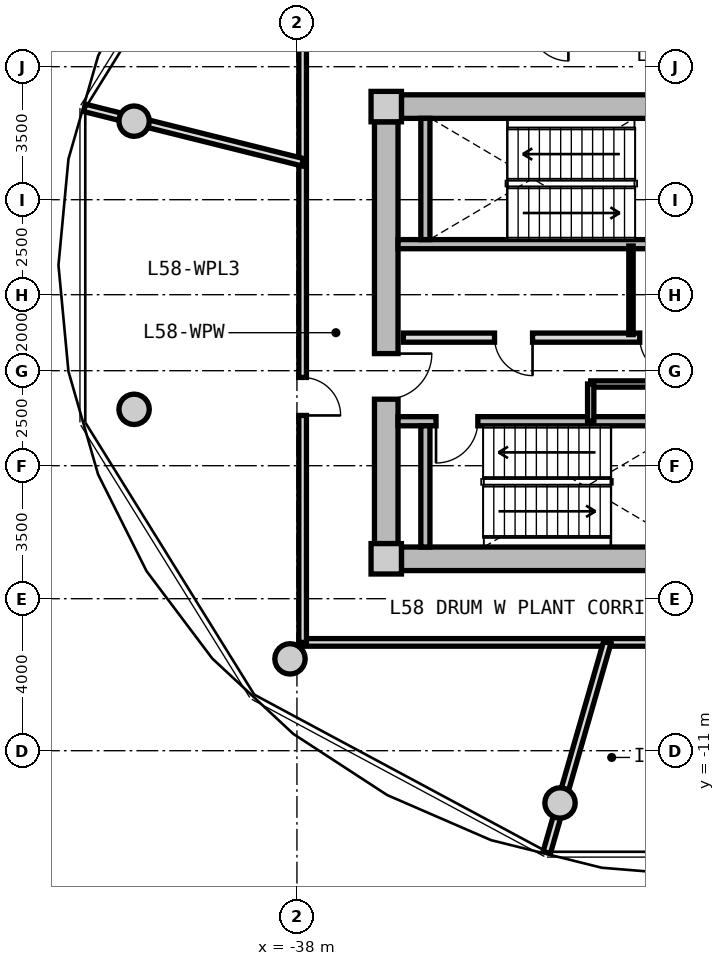
"""IFC4 building model, lengths in metres.
Left out: names, types, materials, properties, quantities, classifications, styles, units other than length and angle.
Written with IfcOpenShell. Run it as: python <this file> out.ifc"""

import sys

from ifc_helpers import new_model, si_unit, direction, frame, frame_2d, origin, origin_2d, place, context, subcontext, project, spatial, rectangle, circle, extrude, source, transform, mapped, element, fill, save


model = new_model("IFC4")
c1 = context("Model", 3, precision=1e-05, world=origin(), true_north=direction((0.0, 1.0)))
c2 = subcontext(c1, "Body", "Model", "MODEL_VIEW")
j1 = project(units=[si_unit("LENGTHUNIT", "METRE"), si_unit("PLANEANGLEUNIT", "RADIAN")], contexts=[c1])
p1 = place(None, origin())
s1 = spatial("IfcSite", under=j1, at=p1, CompositionType="ELEMENT")
p2 = place(p1, origin())
s2 = spatial("IfcBuilding", under=s1, at=p2, CompositionType="ELEMENT")
p3 = place(p2, frame((0.0, 0.0, 186.15)))
s3 = spatial("IfcBuildingStorey", under=s2, at=p3, CompositionType="ELEMENT", Elevation=186.15)
m1 = source(origin(), c2, "Body", "SweptSolid", [
    extrude(rectangle(XDim=0.8, YDim=0.8, at=origin_2d()), origin(), (0.0, 0.0, 1.0), 4.5),
])
for number, where, z_axis, x_axis in (
    (1, (-35.65, -5.95, 0.0), (0.0, 0.0, 1.0), (1.0, 0.0, 0.0)),
    (2, (-35.65, 5.95, 0.0), (0.0, 0.0, 1.0), (1.0, 0.0, 0.0)),
):
    element("IfcColumn", number, at=place(p3, frame(where, z_axis=z_axis, x_axis=x_axis)), inside=s3, PredefinedType="COLUMN", context=c2, shape_type="MappedRepresentation", body=[
        mapped(m1, transform((0.0, 0.0, 0.0), x_axis=(1.0, 0.0, 0.0), y_axis=(0.0, 1.0, 0.0), z_axis=(0.0, 0.0, 1.0), scale=1.0)),
    ])
m2 = source(origin(), c2, "Body", "SweptSolid", [
    extrude(rectangle(XDim=14.5, YDim=0.62, at=frame_2d((7.25, 0.0))), origin(), (0.0, 0.0, 1.0), 4.08),
])
for number, where, z_axis, x_axis in (
    (3, (-35.25, 5.95, 0.0), (0.0, 0.0, 1.0), (1.0, 0.0, 0.0)),
    (4, (-20.75, -5.95, 0.0), (0.0, 0.0, 1.0), (-1.0, 0.0, 0.0)),
):
    element("IfcWall", number, at=place(p3, frame(where, z_axis=z_axis, x_axis=x_axis)), inside=s3, PredefinedType="SHEAR", context=c2, shape_type="MappedRepresentation", body=[
        mapped(m2, transform((0.0, 0.0, 0.0), x_axis=(1.0, 0.0, 0.0), y_axis=(0.0, 1.0, 0.0), z_axis=(0.0, 0.0, 1.0), scale=1.0)),
    ])
m3 = source(origin(), c2, "Body", "SweptSolid", [
    extrude(rectangle(XDim=11.1, YDim=0.62, at=frame_2d((5.55, 0.0))), origin(), (0.0, 0.0, 1.0), 4.08),
])
p4 = place(p3, frame((-35.65, -5.55, 0.0), z_axis=(0.0, 0.0, 1.0), x_axis=(0.0, 1.0, 0.0)))
e5 = element("IfcWall", 5, at=p4, inside=s3, PredefinedType="SHEAR", context=c2, shape_type="MappedRepresentation", body=[
    mapped(m3, transform((0.0, 0.0, 0.0), x_axis=(1.0, 0.0, 0.0), y_axis=(0.0, 1.0, 0.0), z_axis=(0.0, 0.0, 1.0), scale=1.0)),
])
p5 = place(p4, frame((3.8, 0.0, 0.0)))
e6 = element("IfcOpeningElement", 6, at=p5, cuts=e5, PredefinedType="OPENING", context=c2, shape_type="SweptSolid", body=[
    extrude(rectangle(XDim=1.2, YDim=2.15, at=frame_2d((0.6, 1.075))), frame((0.0, 0.32, 0.0), z_axis=(0.0, -1.0, 0.0), x_axis=(1.0, 0.0, 0.0)), (0.0, 0.0, 1.0), 0.64),
])
m4 = source(origin(), c2, "Body", "SweptSolid", [
    extrude(circle(Radius=0.4, at=origin_2d()), origin(), (0.0, 0.0, 1.0), 4.08),
])
for number, where, z_axis, x_axis in (
    (7, (-42.285, 5.567, 0.0), (0.0, 0.0, 1.0), (1.0, 0.0, 0.0)),
    (8, (-42.285, -2.016, 0.0), (0.0, 0.0, 1.0), (1.0, 0.0, 0.0)),
    (9, (-38.183, -8.584, 0.0), (0.0, 0.0, 1.0), (1.0, 0.0, 0.0)),
    (10, (-31.077, -12.375, 0.0), (0.0, 0.0, 1.0), (1.0, 0.0, 0.0)),
):
    element("IfcColumn", number, at=place(p3, frame(where, z_axis=z_axis, x_axis=x_axis)), inside=s3, PredefinedType="COLUMN", context=c2, shape_type="MappedRepresentation", body=[
        mapped(m4, transform((0.0, 0.0, 0.0), x_axis=(1.0, 0.0, 0.0), y_axis=(0.0, 1.0, 0.0), z_axis=(0.0, 0.0, 1.0), scale=1.0)),
    ])
m5 = source(origin(), c2, "Body", "SweptSolid", [
    extrude(rectangle(XDim=7.88, YDim=0.24, at=frame_2d((3.94, 0.0))), origin(), (0.0, 0.0, 1.0), 4.08),
])
p6 = place(p3, frame((-35.34, 2.33, 0.0), z_axis=(0.0, 0.0, 1.0), x_axis=(1.0, 0.0, 0.0)))
e11 = element("IfcWall", 11, at=p6, inside=s3, PredefinedType="PARTITIONING", context=c2, shape_type="MappedRepresentation", body=[
    mapped(m5, transform((0.0, 0.0, 0.0), x_axis=(1.0, 0.0, 0.0), y_axis=(0.0, 1.0, 0.0), z_axis=(0.0, 0.0, 1.0), scale=1.0)),
])
m6 = source(origin(), c2, "Body", "SweptSolid", [
    extrude(rectangle(XDim=3.19, YDim=0.24, at=frame_2d((1.595, 0.0))), origin(), (0.0, 0.0, 1.0), 4.08),
])
p7 = place(p3, frame((-34.62, 2.45, 0.0), z_axis=(0.0, 0.0, 1.0), x_axis=(0.0, 1.0, 0.0)))
e12 = element("IfcWall", 12, at=p7, inside=s3, PredefinedType="PARTITIONING", context=c2, shape_type="MappedRepresentation", body=[
    mapped(m6, transform((0.0, 0.0, 0.0), x_axis=(1.0, 0.0, 0.0), y_axis=(0.0, 1.0, 0.0), z_axis=(0.0, 0.0, 1.0), scale=1.0)),
])
p8 = place(p3, frame((-35.34, -2.33, 0.0), z_axis=(0.0, 0.0, 1.0), x_axis=(1.0, 0.0, 0.0)))
e13 = element("IfcWall", 13, at=p8, inside=s3, PredefinedType="PARTITIONING", context=c2, shape_type="MappedRepresentation", body=[
    mapped(m5, transform((0.0, 0.0, 0.0), x_axis=(1.0, 0.0, 0.0), y_axis=(0.0, 1.0, 0.0), z_axis=(0.0, 0.0, 1.0), scale=1.0)),
])
p9 = place(p8, frame((1.0, 0.0, 0.0)))
e14 = element("IfcOpeningElement", 14, at=p9, cuts=e13, PredefinedType="OPENING", context=c2, shape_type="SweptSolid", body=[
    extrude(rectangle(XDim=1.1, YDim=2.15, at=frame_2d((0.55, 1.075))), frame((0.0, 0.13, 0.0), z_axis=(0.0, -1.0, 0.0), x_axis=(1.0, 0.0, 0.0)), (0.0, 0.0, 1.0), 0.26),
])
p10 = place(p3, frame((-34.62, -5.64, 0.0), z_axis=(0.0, 0.0, 1.0), x_axis=(0.0, 1.0, 0.0)))
e15 = element("IfcWall", 15, at=p10, inside=s3, PredefinedType="PARTITIONING", context=c2, shape_type="MappedRepresentation", body=[
    mapped(m6, transform((0.0, 0.0, 0.0), x_axis=(1.0, 0.0, 0.0), y_axis=(0.0, 1.0, 0.0), z_axis=(0.0, 0.0, 1.0), scale=1.0)),
])
m7 = source(origin(), c2, "Body", "SweptSolid", [
    extrude(rectangle(XDim=7.62, YDim=0.24, at=frame_2d((3.81, 0.0))), origin(), (0.0, 0.0, 1.0), 4.065),
])
p11 = place(p3, frame((-35.2, -0.13, 0.0), z_axis=(0.0, 0.0, 1.0), x_axis=(1.0, 0.0, 0.0)))
e16 = element("IfcWall", 16, at=p11, inside=s3, PredefinedType="PARTITIONING", context=c2, shape_type="MappedRepresentation", body=[
    mapped(m7, transform((0.0, 0.0, 0.0), x_axis=(1.0, 0.0, 0.0), y_axis=(0.0, 1.0, 0.0), z_axis=(0.0, 0.0, 1.0), scale=1.0)),
])
p12 = place(p11, frame((6.22, 0.0, 0.0)))
e17 = element("IfcOpeningElement", 17, at=p12, cuts=e16, PredefinedType="OPENING", context=c2, shape_type="SweptSolid", body=[
    extrude(rectangle(XDim=1.0, YDim=2.1, at=frame_2d((0.5, 1.05))), frame((0.0, 0.13, 0.0), z_axis=(0.0, -1.0, 0.0), x_axis=(1.0, 0.0, 0.0)), (0.0, 0.0, 1.0), 0.26),
])
p13 = place(p11, frame((2.4, 0.0, 0.0)))
e18 = element("IfcOpeningElement", 18, at=p13, cuts=e16, PredefinedType="OPENING", context=c2, shape_type="SweptSolid", body=[
    extrude(rectangle(XDim=1.0, YDim=2.1, at=frame_2d((0.5, 1.05))), frame((0.0, 0.13, 0.0), z_axis=(0.0, -1.0, 0.0), x_axis=(1.0, 0.0, 0.0)), (0.0, 0.0, 1.0), 0.26),
])
m8 = source(origin(), c2, "Body", "SweptSolid", [
    extrude(rectangle(XDim=2.33, YDim=0.115, at=frame_2d((1.165, 0.0))), origin(), (0.0, 0.0, 1.0), 4.065),
])
p14 = place(p3, frame((-29.21, -0.05, 0.0), z_axis=(0.0, 0.0, 1.0), x_axis=(0.0, 1.0, 0.0)))
e19 = element("IfcWall", 19, at=p14, inside=s3, PredefinedType="PARTITIONING", context=c2, shape_type="MappedRepresentation", body=[
    mapped(m8, transform((0.0, 0.0, 0.0), x_axis=(1.0, 0.0, 0.0), y_axis=(0.0, 1.0, 0.0), z_axis=(0.0, 0.0, 1.0), scale=1.0)),
])
m9 = source(origin(), c2, "Body", "SweptSolid", [
    extrude(rectangle(XDim=4.77, YDim=0.165, at=frame_2d((2.385, 0.0))), origin(), (0.0, 0.0, 1.0), 4.065),
])
p15 = place(p3, frame((-30.27, -1.35, 0.0), z_axis=(0.0, 0.0, 1.0), x_axis=(1.0, 0.0, 0.0)))
e20 = element("IfcWall", 20, at=p15, inside=s3, PredefinedType="PARTITIONING", context=c2, shape_type="MappedRepresentation", body=[
    mapped(m9, transform((0.0, 0.0, 0.0), x_axis=(1.0, 0.0, 0.0), y_axis=(0.0, 1.0, 0.0), z_axis=(0.0, 0.0, 1.0), scale=1.0)),
])
p16 = place(p15, frame((1.85, 0.0, 0.0)))
e21 = element("IfcOpeningElement", 21, at=p16, cuts=e20, PredefinedType="OPENING", context=c2, shape_type="SweptSolid", body=[
    extrude(rectangle(XDim=1.0, YDim=2.1, at=frame_2d((0.5, 1.05))), frame((0.0, 0.093, 0.0), z_axis=(0.0, -1.0, 0.0), x_axis=(1.0, 0.0, 0.0)), (0.0, 0.0, 1.0), 0.185),
])
m10 = source(origin(), c2, "Body", "SweptSolid", [
    extrude(rectangle(XDim=0.98, YDim=0.165, at=frame_2d((0.49, 0.0))), origin(), (0.0, 0.0, 1.0), 4.065),
])
p17 = place(p3, frame((-30.27, -2.33, 0.0), z_axis=(0.0, 0.0, 1.0), x_axis=(0.0, 1.0, 0.0)))
e22 = element("IfcWall", 22, at=p17, inside=s3, PredefinedType="PARTITIONING", context=c2, shape_type="MappedRepresentation", body=[
    mapped(m10, transform((0.0, 0.0, 0.0), x_axis=(1.0, 0.0, 0.0), y_axis=(0.0, 1.0, 0.0), z_axis=(0.0, 0.0, 1.0), scale=1.0)),
])
m11 = source(origin(), c2, "Body", "SweptSolid", [
    extrude(rectangle(XDim=19.7, YDim=0.2, at=frame_2d((9.85, 0.0))), origin(), (0.0, 0.0, 1.0), 4.065),
])
p18 = place(p3, frame((-18.15, -8.15, 0.0), z_axis=(0.0, 0.0, 1.0), x_axis=(-1.0, 0.0, 0.0)))
e23 = element("IfcWall", 23, at=p18, inside=s3, PredefinedType="PARTITIONING", context=c2, shape_type="MappedRepresentation", body=[
    mapped(m11, transform((0.0, 0.0, 0.0), x_axis=(1.0, 0.0, 0.0), y_axis=(0.0, 1.0, 0.0), z_axis=(0.0, 0.0, 1.0), scale=1.0)),
])
p19 = place(p18, frame((5.35, 0.0, 0.0)))
e24 = element("IfcOpeningElement", 24, at=p19, cuts=e23, PredefinedType="OPENING", context=c2, shape_type="SweptSolid", body=[
    extrude(rectangle(XDim=1.25, YDim=2.2, at=frame_2d((0.625, 1.1))), frame((0.0, 0.11, 0.0), z_axis=(0.0, -1.0, 0.0), x_axis=(1.0, 0.0, 0.0)), (0.0, 0.0, 1.0), 0.22),
])
m12 = source(origin(), c2, "Body", "SweptSolid", [
    extrude(rectangle(XDim=16.3, YDim=0.2, at=frame_2d((8.15, 0.0))), origin(), (0.0, 0.0, 1.0), 4.065),
])
p20 = place(p3, frame((-37.85, -8.15, 0.0), z_axis=(0.0, 0.0, 1.0), x_axis=(0.0, 1.0, 0.0)))
e25 = element("IfcWall", 25, at=p20, inside=s3, PredefinedType="PARTITIONING", context=c2, shape_type="MappedRepresentation", body=[
    mapped(m12, transform((0.0, 0.0, 0.0), x_axis=(1.0, 0.0, 0.0), y_axis=(0.0, 1.0, 0.0), z_axis=(0.0, 0.0, 1.0), scale=1.0)),
])
p21 = place(p20, frame((5.972, 0.0, 0.0)))
e26 = element("IfcOpeningElement", 26, at=p21, cuts=e25, PredefinedType="OPENING", context=c2, shape_type="SweptSolid", body=[
    extrude(rectangle(XDim=1.0, YDim=2.1, at=frame_2d((0.5, 1.05))), frame((0.0, 0.11, 0.0), z_axis=(0.0, -1.0, 0.0), x_axis=(1.0, 0.0, 0.0)), (0.0, 0.0, 1.0), 0.22),
])
m13 = source(origin(), c2, "Body", "SweptSolid", [
    extrude(rectangle(XDim=5.754, YDim=0.2, at=frame_2d((2.877, 0.0))), origin(), (0.0, 0.0, 1.0), 2.515),
])
p22 = place(p3, frame((-29.834, -8.15, 0.0), z_axis=(0.0, 0.0, 1.0), x_axis=(-0.276793809121, -0.960929335192, 0.0)))
e27 = element("IfcWall", 27, at=p22, inside=s3, PredefinedType="PARTITIONING", context=c2, shape_type="MappedRepresentation", body=[
    mapped(m13, transform((0.0, 0.0, 0.0), x_axis=(1.0, 0.0, 0.0), y_axis=(0.0, 1.0, 0.0), z_axis=(0.0, 0.0, 1.0), scale=1.0)),
])
m14 = source(origin(), c2, "Body", "SweptSolid", [
    extrude(rectangle(XDim=5.914, YDim=0.2, at=frame_2d((2.957, 0.0))), origin(), (0.0, 0.0, 1.0), 4.065),
])
p23 = place(p3, frame((-37.85, 4.486, 0.0), z_axis=(0.0, 0.0, 1.0), x_axis=(-0.970312235668, 0.241855670415, 0.0)))
e28 = element("IfcWall", 28, at=p23, inside=s3, PredefinedType="PARTITIONING", context=c2, shape_type="MappedRepresentation", body=[
    mapped(m14, transform((0.0, 0.0, 0.0), x_axis=(1.0, 0.0, 0.0), y_axis=(0.0, 1.0, 0.0), z_axis=(0.0, 0.0, 1.0), scale=1.0)),
])
m15 = source(origin(), c2, "Body", "SweptSolid", [
    extrude(rectangle(XDim=1.1, YDim=2.15, at=frame_2d((0.55, 1.075))), frame((0.0, 0.025, 0.0), z_axis=(0.0, -1.0, 0.0), x_axis=(1.0, 0.0, 0.0)), (0.0, 0.0, 1.0), 0.05),
])
p24 = place(p9, frame((1.1, 0.0, 0.0), z_axis=(0.0, 0.0, 1.0), x_axis=(-1.0, 0.0, 0.0)))
e29 = element("IfcDoor", 29, at=p24, inside=s3, OperationType="SINGLE_SWING_RIGHT", PredefinedType="DOOR", context=c2, shape_type="MappedRepresentation", body=[
    mapped(m15, transform((0.0, 0.0, 0.0), x_axis=(1.0, 0.0, 0.0), y_axis=(0.0, 1.0, 0.0), z_axis=(0.0, 0.0, 1.0), scale=1.0)),
])
fill(e14, e29)
m16 = source(origin(), c2, "Body", "SweptSolid", [
    extrude(rectangle(XDim=1.2, YDim=2.15, at=frame_2d((0.6, 1.075))), frame((0.0, 0.025, 0.0), z_axis=(0.0, -1.0, 0.0), x_axis=(1.0, 0.0, 0.0)), (0.0, 0.0, 1.0), 0.05),
])
p25 = place(p5, frame((1.2, 0.0, 0.0), z_axis=(0.0, 0.0, 1.0), x_axis=(-1.0, 0.0, 0.0)))
e30 = element("IfcDoor", 30, at=p25, inside=s3, OperationType="SINGLE_SWING_LEFT", PredefinedType="DOOR", context=c2, shape_type="MappedRepresentation", body=[
    mapped(m16, transform((0.0, 0.0, 0.0), x_axis=(1.0, 0.0, 0.0), y_axis=(0.0, 1.0, 0.0), z_axis=(0.0, 0.0, 1.0), scale=1.0)),
])
fill(e6, e30)
m17 = source(origin(), c2, "Body", "SweptSolid", [
    extrude(rectangle(XDim=1.0, YDim=2.1, at=frame_2d((0.5, 1.05))), frame((0.0, 0.025, 0.0), z_axis=(0.0, -1.0, 0.0), x_axis=(1.0, 0.0, 0.0)), (0.0, 0.0, 1.0), 0.05),
])
p26 = place(p12, frame((1.0, 0.0, 0.0), z_axis=(0.0, 0.0, 1.0), x_axis=(-1.0, 0.0, 0.0)))
e31 = element("IfcDoor", 31, at=p26, inside=s3, OperationType="SINGLE_SWING_LEFT", PredefinedType="DOOR", context=c2, shape_type="MappedRepresentation", body=[
    mapped(m17, transform((0.0, 0.0, 0.0), x_axis=(1.0, 0.0, 0.0), y_axis=(0.0, 1.0, 0.0), z_axis=(0.0, 0.0, 1.0), scale=1.0)),
])
fill(e17, e31)
p27 = place(p13, frame((1.0, 0.0, 0.0), z_axis=(0.0, 0.0, 1.0), x_axis=(-1.0, 0.0, 0.0)))
e32 = element("IfcDoor", 32, at=p27, inside=s3, OperationType="SINGLE_SWING_LEFT", PredefinedType="DOOR", context=c2, shape_type="MappedRepresentation", body=[
    mapped(m17, transform((0.0, 0.0, 0.0), x_axis=(1.0, 0.0, 0.0), y_axis=(0.0, 1.0, 0.0), z_axis=(0.0, 0.0, 1.0), scale=1.0)),
])
fill(e18, e32)
p28 = place(p21, frame((1.0, 0.0, 0.0), z_axis=(0.0, 0.0, 1.0), x_axis=(-1.0, 0.0, 0.0)))
e33 = element("IfcDoor", 33, at=p28, inside=s3, OperationType="SINGLE_SWING_RIGHT", PredefinedType="DOOR", context=c2, shape_type="MappedRepresentation", body=[
    mapped(m17, transform((0.0, 0.0, 0.0), x_axis=(1.0, 0.0, 0.0), y_axis=(0.0, 1.0, 0.0), z_axis=(0.0, 0.0, 1.0), scale=1.0)),
])
fill(e26, e33)
save(model, sys.argv[1])
